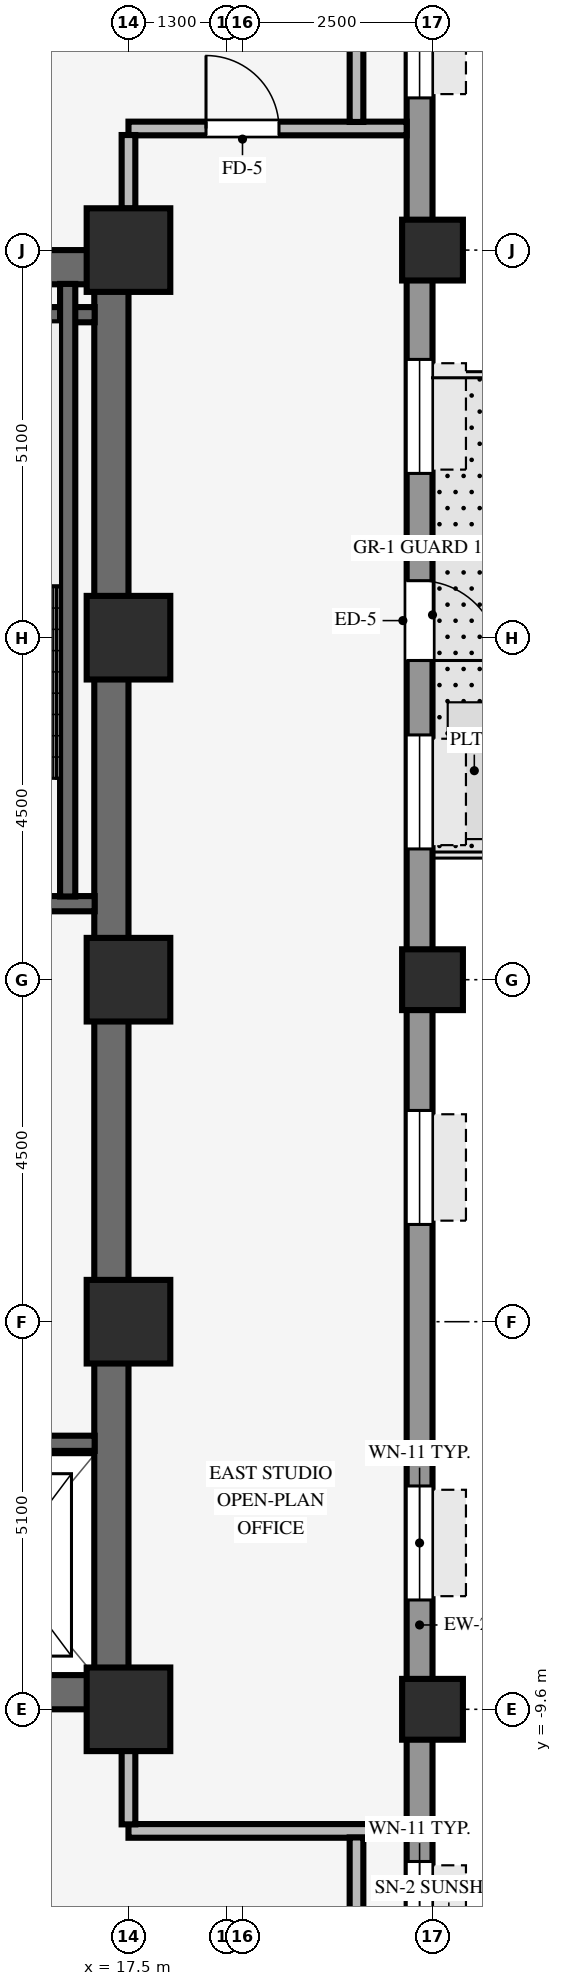
"""IFC4 building model, lengths in metres.
Left out: names, types, materials, properties, quantities, classifications, styles, units other than length and angle.
Written with IfcOpenShell. Run it as: python <this file> out.ifc"""

import sys

from ifc_helpers import new_model, si_unit, direction, frame, frame_2d, origin, origin_2d, place, context, subcontext, project, spatial, rectangle, hollow_rectangle, extrude, source, transform, mapped, element, fill, save


model = new_model("IFC4")
c1 = context("Model", 3, precision=1e-05, world=origin(), true_north=direction((0.0, 1.0)))
c2 = subcontext(c1, "Body", "Model", "MODEL_VIEW")
j1 = project(units=[si_unit("LENGTHUNIT", "METRE"), si_unit("PLANEANGLEUNIT", "RADIAN")], contexts=[c1])
p1 = place(None, origin())
s1 = spatial("IfcSite", under=j1, at=p1, CompositionType="ELEMENT")
p2 = place(p1, origin())
s2 = spatial("IfcBuilding", under=s1, at=p2, CompositionType="ELEMENT")
p3 = place(p2, frame((0.0, 0.0, 75.05)))
s3 = spatial("IfcBuildingStorey", under=s2, at=p3, CompositionType="ELEMENT", Elevation=75.05)
for number, where, z_axis, x_axis in (
    (1, (9.0, -9.375, 0.0), (0.0, 0.0, 1.0), (1.0, 0.0, 0.0)),
    (2, (9.0, 9.375, 0.0), (0.0, 0.0, 1.0), (1.0, 0.0, 0.0)),
):
    element("IfcWall", number, at=place(p3, frame(where, z_axis=z_axis, x_axis=x_axis)), inside=s3, PredefinedType="SHEAR", context=c2, shape_type="SweptSolid", body=[
        extrude(rectangle(XDim=8.5, YDim=0.45, at=frame_2d((4.25, 0.0))), origin(), (0.0, 0.0, 1.0), 3.37),
    ])
p4 = place(p3, frame((17.275, -9.155, 0.0), z_axis=(0.0, 0.0, 1.0), x_axis=(0.0, 1.0, 0.0)))
e3 = element("IfcWall", 3, at=p4, inside=s3, PredefinedType="SHEAR", context=c2, shape_type="SweptSolid", body=[
    extrude(rectangle(XDim=18.31, YDim=0.45, at=frame_2d((9.155, 0.0))), origin(), (0.0, 0.0, 1.0), 3.37),
])
for number, where, z_axis, x_axis in (
    (4, (17.5, -9.6, 0.0), (0.0, 0.0, 1.0), (1.0, 0.0, 0.0)),
    (5, (17.5, -4.5, 0.0), (0.0, 0.0, 1.0), (1.0, 0.0, 0.0)),
    (6, (17.5, 4.5, 0.0), (0.0, 0.0, 1.0), (1.0, 0.0, 0.0)),
    (7, (17.5, 9.6, 0.0), (0.0, 0.0, 1.0), (1.0, 0.0, 0.0)),
    (8, (17.5, 0.0, 0.0), (0.0, 0.0, 1.0), (1.0, 0.0, 0.0)),
):
    element("IfcColumn", number, at=place(p3, frame(where, z_axis=z_axis, x_axis=x_axis)), inside=s3, PredefinedType="COLUMN", context=c2, shape_type="SweptSolid", body=[
        extrude(rectangle(XDim=1.1, YDim=1.1, at=origin_2d()), origin(), (0.0, 0.0, 1.0), 3.37),
    ])
for number, where, z_axis, x_axis in (
    (9, (21.5, -9.6, 0.0), (0.0, 0.0, 1.0), (1.0, 0.0, 0.0)),
    (10, (21.5, 0.0, 0.0), (0.0, 0.0, 1.0), (1.0, 0.0, 0.0)),
    (11, (21.5, 9.6, 0.0), (0.0, 0.0, 1.0), (1.0, 0.0, 0.0)),
):
    element("IfcColumn", number, at=place(p3, frame(where, z_axis=z_axis, x_axis=x_axis)), inside=s3, PredefinedType="COLUMN", context=c2, shape_type="SweptSolid", body=[
        extrude(hollow_rectangle(XDim=0.8, YDim=0.8, WallThickness=0.055, InnerFilletRadius=0.055, OuterFilletRadius=0.11, at=origin_2d()), origin(), (0.0, 0.0, 1.0), 3.37),
    ])
p5 = place(p3, frame((21.33, -20.764, 0.0), z_axis=(0.0, 0.0, 1.0), x_axis=(0.0, 1.0, 0.0)))
e12 = element("IfcWall", 12, at=p5, inside=s3, PredefinedType="STANDARD", context=c2, shape_type="SweptSolid", body=[
    extrude(rectangle(XDim=41.528, YDim=0.34, at=frame_2d((20.764, 0.0))), origin(), (0.0, 0.0, 1.0), 2.705),
])
p6 = place(p5, frame((26.014, 0.0, 0.0), z_axis=(0.0, 0.0, 1.0), x_axis=(-1.0, 0.0, 0.0)))
e13 = element("IfcOpeningElement", 13, at=p6, cuts=e12, PredefinedType="OPENING", context=c2, shape_type="SweptSolid", body=[
    extrude(rectangle(XDim=1.05, YDim=2.1, at=frame_2d((0.525, 1.05))), frame((0.0, 0.18, 0.0), z_axis=(0.0, -1.0, 0.0), x_axis=(1.0, 0.0, 0.0)), (0.0, 0.0, 1.0), 0.36),
])
p7 = place(p5, frame((1.371, 0.0, 0.8)))
e14 = element("IfcOpeningElement", 14, at=p7, cuts=e12, PredefinedType="OPENING", context=c2, shape_type="SweptSolid", body=[
    extrude(rectangle(XDim=1.5, YDim=1.6, at=frame_2d((0.75, 0.8))), frame((0.0, 0.18, 0.0), z_axis=(0.0, -1.0, 0.0), x_axis=(1.0, 0.0, 0.0)), (0.0, 0.0, 1.0), 0.36),
])
p8 = place(p5, frame((7.662, 0.0, 0.8)))
e15 = element("IfcOpeningElement", 15, at=p8, cuts=e12, PredefinedType="OPENING", context=c2, shape_type="SweptSolid", body=[
    extrude(rectangle(XDim=1.5, YDim=1.6, at=frame_2d((0.75, 0.8))), frame((0.0, 0.18, 0.0), z_axis=(0.0, -1.0, 0.0), x_axis=(1.0, 0.0, 0.0)), (0.0, 0.0, 1.0), 0.36),
])
p9 = place(p5, frame((12.603, 0.0, 0.8)))
e16 = element("IfcOpeningElement", 16, at=p9, cuts=e12, PredefinedType="OPENING", context=c2, shape_type="SweptSolid", body=[
    extrude(rectangle(XDim=1.5, YDim=1.6, at=frame_2d((0.75, 0.8))), frame((0.0, 0.18, 0.0), z_axis=(0.0, -1.0, 0.0), x_axis=(1.0, 0.0, 0.0)), (0.0, 0.0, 1.0), 0.36),
])
p10 = place(p5, frame((17.543, 0.0, 0.8)))
e17 = element("IfcOpeningElement", 17, at=p10, cuts=e12, PredefinedType="OPENING", context=c2, shape_type="SweptSolid", body=[
    extrude(rectangle(XDim=1.5, YDim=1.6, at=frame_2d((0.75, 0.8))), frame((0.0, 0.18, 0.0), z_axis=(0.0, -1.0, 0.0), x_axis=(1.0, 0.0, 0.0)), (0.0, 0.0, 1.0), 0.36),
])
p11 = place(p5, frame((22.485, 0.0, 0.8)))
e18 = element("IfcOpeningElement", 18, at=p11, cuts=e12, PredefinedType="OPENING", context=c2, shape_type="SweptSolid", body=[
    extrude(rectangle(XDim=1.5, YDim=1.6, at=frame_2d((0.75, 0.8))), frame((0.0, 0.18, 0.0), z_axis=(0.0, -1.0, 0.0), x_axis=(1.0, 0.0, 0.0)), (0.0, 0.0, 1.0), 0.36),
])
p12 = place(p5, frame((27.426, 0.0, 0.8)))
e19 = element("IfcOpeningElement", 19, at=p12, cuts=e12, PredefinedType="OPENING", context=c2, shape_type="SweptSolid", body=[
    extrude(rectangle(XDim=1.5, YDim=1.6, at=frame_2d((0.75, 0.8))), frame((0.0, 0.18, 0.0), z_axis=(0.0, -1.0, 0.0), x_axis=(1.0, 0.0, 0.0)), (0.0, 0.0, 1.0), 0.36),
])
p13 = place(p5, frame((32.366, 0.0, 0.8)))
e20 = element("IfcOpeningElement", 20, at=p13, cuts=e12, PredefinedType="OPENING", context=c2, shape_type="SweptSolid", body=[
    extrude(rectangle(XDim=1.5, YDim=1.6, at=frame_2d((0.75, 0.8))), frame((0.0, 0.18, 0.0), z_axis=(0.0, -1.0, 0.0), x_axis=(1.0, 0.0, 0.0)), (0.0, 0.0, 1.0), 0.36),
])
p14 = place(p5, frame((38.657, 0.0, 0.8)))
e21 = element("IfcOpeningElement", 21, at=p14, cuts=e12, PredefinedType="OPENING", context=c2, shape_type="SweptSolid", body=[
    extrude(rectangle(XDim=1.5, YDim=1.6, at=frame_2d((0.75, 0.8))), frame((0.0, 0.18, 0.0), z_axis=(0.0, -1.0, 0.0), x_axis=(1.0, 0.0, 0.0)), (0.0, 0.0, 1.0), 0.36),
])
for number, where, z_axis, x_axis in (
    (22, (13.535, 1.0, 0.0), (0.0, 0.0, 1.0), (1.0, 0.0, 0.0)),
    (23, (13.535, 8.75, 0.0), (0.0, 0.0, 1.0), (1.0, 0.0, 0.0)),
):
    element("IfcWall", number, at=place(p3, frame(where, z_axis=z_axis, x_axis=x_axis)), inside=s3, PredefinedType="SHEAR", context=c2, shape_type="SweptSolid", body=[
        extrude(rectangle(XDim=3.52, YDim=0.2, at=frame_2d((1.76, 0.0))), origin(), (0.0, 0.0, 1.0), 3.37),
    ])
p15 = place(p3, frame((16.7, 1.095, 0.0), z_axis=(0.0, 0.0, 1.0), x_axis=(0.0, 1.0, 0.0)))
e24 = element("IfcWall", 24, at=p15, inside=s3, PredefinedType="SHEAR", context=c2, shape_type="SweptSolid", body=[
    extrude(rectangle(XDim=8.06, YDim=0.2, at=frame_2d((4.03, 0.0))), origin(), (0.0, 0.0, 1.0), 3.37),
])
p16 = place(p3, frame((14.645, -6.1, 0.0), z_axis=(0.0, 0.0, 1.0), x_axis=(1.0, 0.0, 0.0)))
e25 = element("IfcWall", 25, at=p16, inside=s3, PredefinedType="SHEAR", context=c2, shape_type="SweptSolid", body=[
    extrude(rectangle(XDim=2.41, YDim=0.2, at=frame_2d((1.205, 0.0))), origin(), (0.0, 0.0, 1.0), 3.37),
])
p17 = place(p3, frame((17.5, -11.2, 0.0), z_axis=(0.0, 0.0, 1.0), x_axis=(1.0, 0.0, 0.0)))
e26 = element("IfcWall", 26, at=p17, inside=s3, PredefinedType="PARTITIONING", context=c2, shape_type="SweptSolid", body=[
    extrude(rectangle(XDim=3.66, YDim=0.18, at=frame_2d((1.83, 0.0))), origin(), (0.0, 0.0, 1.0), 3.36),
])
p18 = place(p3, frame((17.5, 11.2, 0.0), z_axis=(0.0, 0.0, 1.0), x_axis=(1.0, 0.0, 0.0)))
e27 = element("IfcWall", 27, at=p18, inside=s3, PredefinedType="PARTITIONING", context=c2, shape_type="SweptSolid", body=[
    extrude(rectangle(XDim=3.66, YDim=0.18, at=frame_2d((1.83, 0.0))), origin(), (0.0, 0.0, 1.0), 3.36),
])
p19 = place(p18, frame((1.02, 0.0, 0.0)))
e28 = element("IfcOpeningElement", 28, at=p19, cuts=e27, PredefinedType="OPENING", context=c2, shape_type="SweptSolid", body=[
    extrude(rectangle(XDim=0.96, YDim=2.1, at=frame_2d((0.48, 1.05))), frame((0.0, 0.1, 0.0), z_axis=(0.0, -1.0, 0.0), x_axis=(1.0, 0.0, 0.0)), (0.0, 0.0, 1.0), 0.2),
])
for number, where, z_axis, x_axis in (
    (29, (17.5, -11.114, 0.0), (0.0, 0.0, 1.0), (0.0, 1.0, 0.0)),
    (30, (17.5, 10.146, 0.0), (0.0, 0.0, 1.0), (0.0, 1.0, 0.0)),
):
    element("IfcWall", number, at=place(p3, frame(where, z_axis=z_axis, x_axis=x_axis)), inside=s3, PredefinedType="PARTITIONING", context=c2, shape_type="SweptSolid", body=[
        extrude(rectangle(XDim=0.968, YDim=0.18, at=frame_2d((0.484, 0.0))), origin(), (0.0, 0.0, 1.0), 2.738),
    ])
for number, where, z_axis, x_axis in (
    (31, (20.5, -13.514, 0.0), (0.0, 0.0, 1.0), (0.0, 1.0, 0.0)),
    (32, (20.5, 11.286, 0.0), (0.0, 0.0, 1.0), (0.0, 1.0, 0.0)),
):
    element("IfcWall", number, at=place(p3, frame(where, z_axis=z_axis, x_axis=x_axis)), inside=s3, PredefinedType="PARTITIONING", context=c2, shape_type="SweptSolid", body=[
        extrude(rectangle(XDim=2.228, YDim=0.18, at=frame_2d((1.114, 0.0))), origin(), (0.0, 0.0, 1.0), 3.36),
    ])
m1 = source(origin(), c2, "Body", "SweptSolid", [
    extrude(rectangle(XDim=1.05, YDim=2.1, at=frame_2d((0.525, 1.05))), frame((0.0, 0.025, 0.0), z_axis=(0.0, -1.0, 0.0), x_axis=(1.0, 0.0, 0.0)), (0.0, 0.0, 1.0), 0.05),
])
p20 = place(p6, origin())
e33 = element("IfcDoor", 33, at=p20, inside=s3, OperationType="SINGLE_SWING_RIGHT", PredefinedType="DOOR", context=c2, shape_type="MappedRepresentation", body=[
    mapped(m1, transform((0.0, 0.0, 0.0), scale=1.0)),
])
fill(e13, e33)
m2 = source(origin(), c2, "Body", "SweptSolid", [
    extrude(rectangle(XDim=1.5, YDim=1.6, at=frame_2d((0.75, 0.8))), frame((0.0, 0.03, 0.0), z_axis=(0.0, -1.0, 0.0), x_axis=(1.0, 0.0, 0.0)), (0.0, 0.0, 1.0), 0.06),
])
p21 = place(p8, origin())
e34 = element("IfcWindow", 34, at=p21, inside=s3, PartitioningType="SINGLE_PANEL", PredefinedType="WINDOW", context=c2, shape_type="MappedRepresentation", body=[
    mapped(m2, transform((0.0, 0.0, 0.0), scale=1.0)),
])
fill(e15, e34)
p22 = place(p9, origin())
e35 = element("IfcWindow", 35, at=p22, inside=s3, PartitioningType="SINGLE_PANEL", PredefinedType="WINDOW", context=c2, shape_type="MappedRepresentation", body=[
    mapped(m2, transform((0.0, 0.0, 0.0), scale=1.0)),
])
fill(e16, e35)
p23 = place(p10, origin())
e36 = element("IfcWindow", 36, at=p23, inside=s3, PartitioningType="SINGLE_PANEL", PredefinedType="WINDOW", context=c2, shape_type="MappedRepresentation", body=[
    mapped(m2, transform((0.0, 0.0, 0.0), scale=1.0)),
])
fill(e17, e36)
p24 = place(p11, origin())
e37 = element("IfcWindow", 37, at=p24, inside=s3, PartitioningType="SINGLE_PANEL", PredefinedType="WINDOW", context=c2, shape_type="MappedRepresentation", body=[
    mapped(m2, transform((0.0, 0.0, 0.0), scale=1.0)),
])
fill(e18, e37)
p25 = place(p12, origin())
e38 = element("IfcWindow", 38, at=p25, inside=s3, PartitioningType="SINGLE_PANEL", PredefinedType="WINDOW", context=c2, shape_type="MappedRepresentation", body=[
    mapped(m2, transform((0.0, 0.0, 0.0), scale=1.0)),
])
fill(e19, e38)
p26 = place(p13, origin())
e39 = element("IfcWindow", 39, at=p26, inside=s3, PartitioningType="SINGLE_PANEL", PredefinedType="WINDOW", context=c2, shape_type="MappedRepresentation", body=[
    mapped(m2, transform((0.0, 0.0, 0.0), scale=1.0)),
])
fill(e20, e39)
m3 = source(origin(), c2, "Body", "SweptSolid", [
    extrude(rectangle(XDim=0.96, YDim=2.1, at=frame_2d((0.48, 1.05))), frame((0.0, 0.025, 0.0), z_axis=(0.0, -1.0, 0.0), x_axis=(1.0, 0.0, 0.0)), (0.0, 0.0, 1.0), 0.05),
])
p27 = place(p19, origin())
e40 = element("IfcDoor", 40, at=p27, inside=s3, OperationType="SINGLE_SWING_LEFT", PredefinedType="DOOR", context=c2, shape_type="MappedRepresentation", body=[
    mapped(m3, transform((0.0, 0.0, 0.0), scale=1.0)),
])
fill(e28, e40)
save(model, sys.argv[1])
